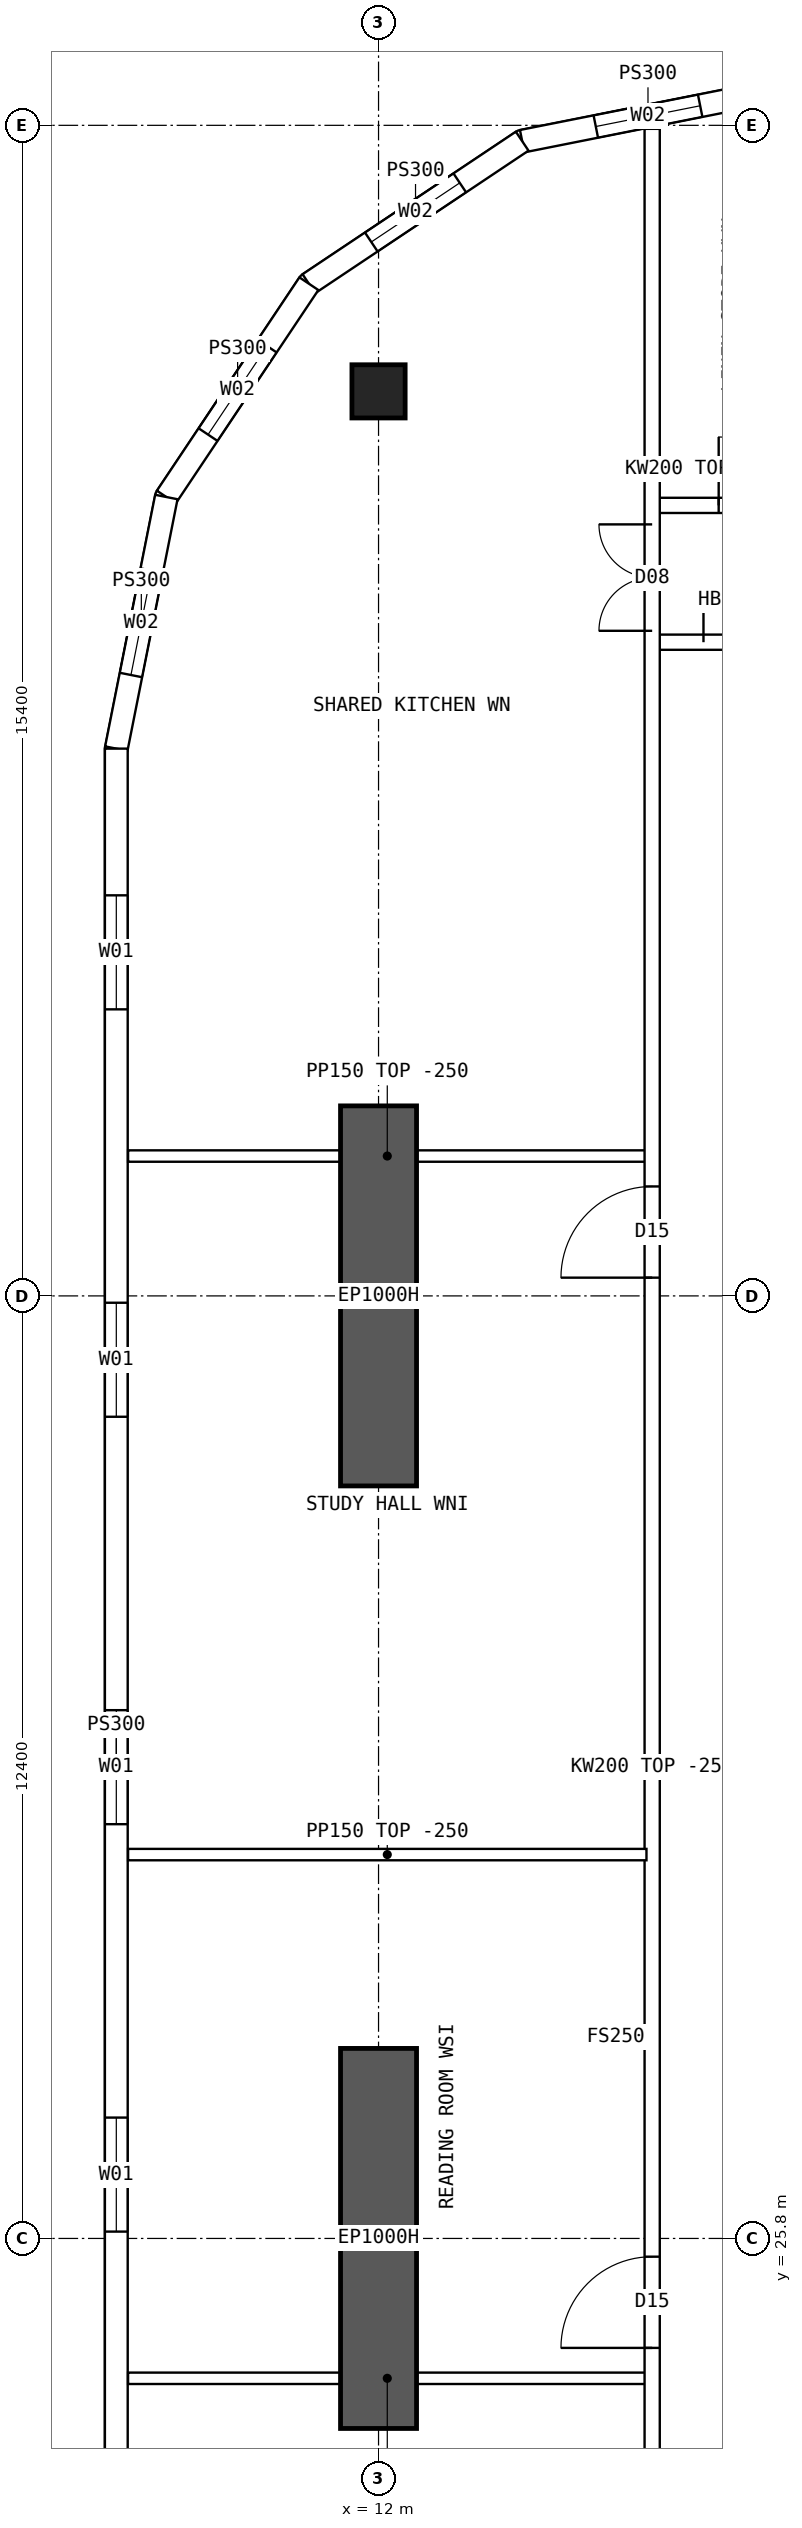
"""IFC4 building model, lengths in metres.
Left out: names, types, materials, properties, quantities, classifications, styles, units other than length and angle.
Written with IfcOpenShell. Run it as: python <this file> out.ifc"""

import sys

from ifc_helpers import new_model, si_unit, direction, frame, frame_2d, origin, origin_2d, place, context, subcontext, project, spatial, polyline, rectangle, hollow_rectangle, outline, extrude, element, fill, save


model = new_model("IFC4")
c1 = context("Model", 3, precision=1e-05, world=origin(), true_north=direction((0.0, 1.0)))
c2 = subcontext(c1, "Body", "Model", "MODEL_VIEW")
j1 = project(units=[si_unit("LENGTHUNIT", "METRE"), si_unit("PLANEANGLEUNIT", "RADIAN")], contexts=[c1])
p1 = place(None, origin())
s1 = spatial("IfcSite", under=j1, at=p1, CompositionType="ELEMENT")
p2 = place(p1, origin())
s2 = spatial("IfcBuilding", under=s1, at=p2, CompositionType="ELEMENT")
p3 = place(p2, frame((0.0, 0.0, 156.1)))
s3 = spatial("IfcBuildingStorey", under=s2, at=p3, CompositionType="ELEMENT", Elevation=156.1)
p4 = place(p3, frame((12.0, 50.1, 0.0), z_axis=(0.0, 0.0, 1.0), x_axis=(1.0, 0.0, 0.0)))
e1 = element("IfcColumn", 1, at=p4, inside=s3, PredefinedType="COLUMN", context=c2, shape_type="SweptSolid", body=[
    extrude(hollow_rectangle(XDim=0.7, YDim=0.7, WallThickness=0.07, at=origin_2d()), origin(), (0.0, 0.0, 1.0), 3.75),
])
for number, where, z_axis, x_axis in (
    (2, (12.0, 23.3, 0.0), (0.0, 0.0, 1.0), (0.0, 1.0, 0.0)),
    (3, (12.0, 35.7, 0.0), (0.0, 0.0, 1.0), (0.0, 1.0, 0.0)),
):
    element("IfcWall", number, at=place(p3, frame(where, z_axis=z_axis, x_axis=x_axis)), inside=s3, PredefinedType="SHEAR", context=c2, shape_type="SweptSolid", body=[
        extrude(rectangle(XDim=5.0, YDim=1.0, at=frame_2d((2.5, 0.0))), origin(), (0.0, 0.0, 1.0), 3.75),
    ])
p5 = place(p3, frame((8.55, 45.4, 0.0), z_axis=(0.0, 0.0, 1.0), x_axis=(0.0, -1.0, 0.0)))
e4 = element("IfcWall", 4, at=p5, inside=s3, PredefinedType="SOLIDWALL", context=c2, shape_type="SweptSolid", body=[
    extrude(outline(polyline([(-0.015, -0.15), (26.815, -0.15), (26.785, 0.15), (0.015, 0.15), (-0.015, -0.15)])), origin(), (0.0, 0.0, 1.0), 3.5),
])
p6 = place(p5, frame((1.93, 0.0, 0.9)))
e5 = element("IfcOpeningElement", 5, at=p6, cuts=e4, PredefinedType="OPENING", context=c2, shape_type="SweptSolid", body=[
    extrude(rectangle(XDim=1.5, YDim=2.0, at=frame_2d((0.75, 1.0))), frame((0.0, 0.16, 0.0), z_axis=(0.0, -1.0, 0.0), x_axis=(1.0, 0.0, 0.0)), (0.0, 0.0, 1.0), 0.32),
])
p7 = place(p5, frame((7.29, 0.0, 0.9)))
e6 = element("IfcOpeningElement", 6, at=p7, cuts=e4, PredefinedType="OPENING", context=c2, shape_type="SweptSolid", body=[
    extrude(rectangle(XDim=1.5, YDim=2.0, at=frame_2d((0.75, 1.0))), frame((0.0, 0.16, 0.0), z_axis=(0.0, -1.0, 0.0), x_axis=(1.0, 0.0, 0.0)), (0.0, 0.0, 1.0), 0.32),
])
p8 = place(p5, frame((12.65, 0.0, 0.9)))
e7 = element("IfcOpeningElement", 7, at=p8, cuts=e4, PredefinedType="OPENING", context=c2, shape_type="SweptSolid", body=[
    extrude(rectangle(XDim=1.5, YDim=2.0, at=frame_2d((0.75, 1.0))), frame((0.0, 0.16, 0.0), z_axis=(0.0, -1.0, 0.0), x_axis=(1.0, 0.0, 0.0)), (0.0, 0.0, 1.0), 0.32),
])
p9 = place(p5, frame((18.01, 0.0, 0.9)))
e8 = element("IfcOpeningElement", 8, at=p9, cuts=e4, PredefinedType="OPENING", context=c2, shape_type="SweptSolid", body=[
    extrude(rectangle(XDim=1.5, YDim=2.0, at=frame_2d((0.75, 1.0))), frame((0.0, 0.16, 0.0), z_axis=(0.0, -1.0, 0.0), x_axis=(1.0, 0.0, 0.0)), (0.0, 0.0, 1.0), 0.32),
])
p10 = place(p5, frame((23.37, 0.0, 0.9)))
e9 = element("IfcOpeningElement", 9, at=p10, cuts=e4, PredefinedType="OPENING", context=c2, shape_type="SweptSolid", body=[
    extrude(rectangle(XDim=1.5, YDim=2.0, at=frame_2d((0.75, 1.0))), frame((0.0, 0.16, 0.0), z_axis=(0.0, -1.0, 0.0), x_axis=(1.0, 0.0, 0.0)), (0.0, 0.0, 1.0), 0.32),
])
p11 = place(p3, frame((17.2, 54.05, 0.0), z_axis=(0.0, 0.0, 1.0), x_axis=(-0.98078325777, -0.195100490205, 0.0)))
e10 = element("IfcWall", 10, at=p11, inside=s3, PredefinedType="SOLIDWALL", context=c2, shape_type="SweptSolid", body=[
    extrude(outline(polyline([(-0.03, -0.15), (3.405, -0.15), (3.345, 0.15), (0.03, 0.15), (-0.03, -0.15)])), origin(), (0.0, 0.0, 1.0), 3.5),
])
p12 = place(p11, frame((0.988, 0.0, 0.9)))
e11 = element("IfcOpeningElement", 11, at=p12, cuts=e10, PredefinedType="OPENING", context=c2, shape_type="SweptSolid", body=[
    extrude(rectangle(XDim=1.4, YDim=1.8, at=frame_2d((0.7, 0.9))), frame((0.0, 0.16, 0.0), z_axis=(0.0, -1.0, 0.0), x_axis=(1.0, 0.0, 0.0)), (0.0, 0.0, 1.0), 0.32),
])
p13 = place(p3, frame((13.89, 53.392, 0.0), z_axis=(0.0, 0.0, 1.0), x_axis=(-0.831493450887, -0.555534554399, 0.0)))
e12 = element("IfcWall", 12, at=p13, inside=s3, PredefinedType="SOLIDWALL", context=c2, shape_type="SweptSolid", body=[
    extrude(outline(polyline([(-0.03, -0.15), (3.405, -0.15), (3.345, 0.15), (0.03, 0.15), (-0.03, -0.15)])), origin(), (0.0, 0.0, 1.0), 3.5),
])
p14 = place(p13, frame((0.988, 0.0, 0.9)))
e13 = element("IfcOpeningElement", 13, at=p14, cuts=e12, PredefinedType="OPENING", context=c2, shape_type="SweptSolid", body=[
    extrude(rectangle(XDim=1.4, YDim=1.8, at=frame_2d((0.7, 0.9))), frame((0.0, 0.16, 0.0), z_axis=(0.0, -1.0, 0.0), x_axis=(1.0, 0.0, 0.0)), (0.0, 0.0, 1.0), 0.32),
])
p15 = place(p3, frame((11.083, 51.517, 0.0), z_axis=(0.0, 0.0, 1.0), x_axis=(-0.555534554399, -0.831493450887, 0.0)))
e14 = element("IfcWall", 14, at=p15, inside=s3, PredefinedType="SOLIDWALL", context=c2, shape_type="SweptSolid", body=[
    extrude(outline(polyline([(-0.03, -0.15), (3.405, -0.15), (3.345, 0.15), (0.03, 0.15), (-0.03, -0.15)])), origin(), (0.0, 0.0, 1.0), 3.5),
])
p16 = place(p15, frame((0.988, 0.0, 0.9)))
e15 = element("IfcOpeningElement", 15, at=p16, cuts=e14, PredefinedType="OPENING", context=c2, shape_type="SweptSolid", body=[
    extrude(rectangle(XDim=1.4, YDim=1.8, at=frame_2d((0.7, 0.9))), frame((0.0, 0.16, 0.0), z_axis=(0.0, -1.0, 0.0), x_axis=(1.0, 0.0, 0.0)), (0.0, 0.0, 1.0), 0.32),
])
p17 = place(p3, frame((9.208, 48.71, 0.0), z_axis=(0.0, 0.0, 1.0), x_axis=(-0.19508664885, -0.980786011034, 0.0)))
e16 = element("IfcWall", 16, at=p17, inside=s3, PredefinedType="SOLIDWALL", context=c2, shape_type="SweptSolid", body=[
    extrude(outline(polyline([(-0.03, -0.15), (3.39, -0.15), (3.36, 0.15), (0.03, 0.15), (-0.03, -0.15)])), origin(), (0.0, 0.0, 1.0), 3.5),
])
p18 = place(p17, frame((0.988, 0.0, 0.9)))
e17 = element("IfcOpeningElement", 17, at=p18, cuts=e16, PredefinedType="OPENING", context=c2, shape_type="SweptSolid", body=[
    extrude(rectangle(XDim=1.4, YDim=1.8, at=frame_2d((0.7, 0.9))), frame((0.0, 0.16, 0.0), z_axis=(0.0, -1.0, 0.0), x_axis=(1.0, 0.0, 0.0)), (0.0, 0.0, 1.0), 0.32),
])
p19 = place(p3, frame((15.6, 48.6, 0.0), z_axis=(0.0, 0.0, 1.0), x_axis=(1.0, 0.0, 0.0)))
e18 = element("IfcWall", 18, at=p19, inside=s3, PredefinedType="SOLIDWALL", context=c2, shape_type="SweptSolid", body=[
    extrude(rectangle(XDim=1.975, YDim=0.2, at=frame_2d((0.987, 0.0))), origin(), (0.0, 0.0, 1.0), 3.5),
])
p20 = place(p19, frame((0.875, 0.0, 0.0)))
e19 = element("IfcOpeningElement", 19, at=p20, cuts=e18, PredefinedType="OPENING", context=c2, shape_type="SweptSolid", body=[
    extrude(rectangle(XDim=0.9, YDim=2.1, at=frame_2d((0.45, 1.05))), frame((0.0, 0.11, 0.0), z_axis=(0.0, -1.0, 0.0), x_axis=(1.0, 0.0, 0.0)), (0.0, 0.0, 1.0), 0.22),
])
p21 = place(p3, frame((15.6, 46.8, 0.0), z_axis=(0.0, 0.0, 1.0), x_axis=(1.0, 0.0, 0.0)))
e20 = element("IfcWall", 20, at=p21, inside=s3, PredefinedType="SOLIDWALL", context=c2, shape_type="SweptSolid", body=[
    extrude(rectangle(XDim=1.975, YDim=0.2, at=frame_2d((0.987, 0.0))), origin(), (0.0, 0.0, 1.0), 3.5),
])
p22 = place(p21, frame((0.675, 0.0, 0.0)))
e21 = element("IfcOpeningElement", 21, at=p22, cuts=e20, PredefinedType="OPENING", context=c2, shape_type="SweptSolid", body=[
    extrude(rectangle(XDim=1.2, YDim=2.1, at=frame_2d((0.6, 1.05))), frame((0.0, 0.11, 0.0), z_axis=(0.0, -1.0, 0.0), x_axis=(1.0, 0.0, 0.0)), (0.0, 0.0, 1.0), 0.22),
])
p23 = place(p3, frame((8.705, 30.85, 0.0), z_axis=(0.0, 0.0, 1.0), x_axis=(1.0, 0.0, 0.0)))
e22 = element("IfcWall", 22, at=p23, inside=s3, PredefinedType="PARTITIONING", context=c2, shape_type="SweptSolid", body=[
    extrude(outline(polyline([(0.0, 0.0), (6.82, 0.0), (6.82, 3.5), (3.597, 3.5), (3.595, 3.05), (2.997, 3.05), (2.995, 3.5), (0.0, 3.5), (0.0, 0.0)])), frame((0.0, 0.075, 0.0), z_axis=(0.0, -1.0, 0.0), x_axis=(1.0, 0.0, 0.0)), (0.0, 0.0, 1.0), 0.15),
])
p24 = place(p3, frame((15.6, 10.446, 0.0), z_axis=(0.0, 0.0, 1.0), x_axis=(0.0, 1.0, 0.0)))
e23 = element("IfcWall", 23, at=p24, inside=s3, PredefinedType="SOLIDWALL", context=c2, shape_type="SweptSolid", body=[
    extrude(rectangle(XDim=43.107, YDim=0.2, at=frame_2d((21.554, 0.0))), origin(), (0.0, 0.0, 1.0), 3.5),
])
p25 = place(p24, frame((13.914, 0.0, 0.0)))
e24 = element("IfcOpeningElement", 24, at=p25, cuts=e23, PredefinedType="OPENING", context=c2, shape_type="SweptSolid", body=[
    extrude(rectangle(XDim=1.2, YDim=2.1, at=frame_2d((0.6, 1.05))), frame((0.0, 0.11, 0.0), z_axis=(0.0, -1.0, 0.0), x_axis=(1.0, 0.0, 0.0)), (0.0, 0.0, 1.0), 0.22),
])
p26 = place(p24, frame((27.994, 0.0, 0.0)))
e25 = element("IfcOpeningElement", 25, at=p26, cuts=e23, PredefinedType="OPENING", context=c2, shape_type="SweptSolid", body=[
    extrude(rectangle(XDim=1.2, YDim=2.1, at=frame_2d((0.6, 1.05))), frame((0.0, 0.11, 0.0), z_axis=(0.0, -1.0, 0.0), x_axis=(1.0, 0.0, 0.0)), (0.0, 0.0, 1.0), 0.22),
])
p27 = place(p24, frame((5.104, 0.0, 0.0)))
e26 = element("IfcOpeningElement", 26, at=p27, cuts=e23, PredefinedType="OPENING", context=c2, shape_type="SweptSolid", body=[
    extrude(rectangle(XDim=1.4, YDim=2.1, at=frame_2d((0.7, 1.05))), frame((0.0, 0.11, 0.0), z_axis=(0.0, -1.0, 0.0), x_axis=(1.0, 0.0, 0.0)), (0.0, 0.0, 1.0), 0.22),
])
p28 = place(p24, frame((36.504, 0.0, 0.0)))
e27 = element("IfcOpeningElement", 27, at=p28, cuts=e23, PredefinedType="OPENING", context=c2, shape_type="SweptSolid", body=[
    extrude(rectangle(XDim=1.4, YDim=2.1, at=frame_2d((0.7, 1.05))), frame((0.0, 0.11, 0.0), z_axis=(0.0, -1.0, 0.0), x_axis=(1.0, 0.0, 0.0)), (0.0, 0.0, 1.0), 0.22),
])
for number, where, z_axis, x_axis in (
    (28, (8.705, 23.96, 0.0), (0.0, 0.0, 1.0), (1.0, 0.0, 0.0)),
    (29, (8.705, 40.04, 0.0), (0.0, 0.0, 1.0), (1.0, 0.0, 0.0)),
):
    element("IfcWall", number, at=place(p3, frame(where, z_axis=z_axis, x_axis=x_axis)), inside=s3, PredefinedType="PARTITIONING", context=c2, shape_type="SweptSolid", body=[
        extrude(rectangle(XDim=6.82, YDim=0.15, at=frame_2d((3.41, 0.0))), origin(), (0.0, 0.0, 1.0), 3.5),
    ])
p29 = place(p6, origin())
e30 = element("IfcWindow", 30, at=p29, inside=s3, PartitioningType="SINGLE_PANEL", PredefinedType="WINDOW", context=c2, shape_type="SweptSolid", body=[
    extrude(rectangle(XDim=1.5, YDim=2.0, at=frame_2d((0.75, 1.0))), frame((0.0, 0.03, 0.0), z_axis=(0.0, -1.0, 0.0), x_axis=(1.0, 0.0, 0.0)), (0.0, 0.0, 1.0), 0.06),
])
fill(e5, e30)
p30 = place(p7, origin())
e31 = element("IfcWindow", 31, at=p30, inside=s3, PartitioningType="SINGLE_PANEL", PredefinedType="WINDOW", context=c2, shape_type="SweptSolid", body=[
    extrude(rectangle(XDim=1.5, YDim=2.0, at=frame_2d((0.75, 1.0))), frame((0.0, 0.03, 0.0), z_axis=(0.0, -1.0, 0.0), x_axis=(1.0, 0.0, 0.0)), (0.0, 0.0, 1.0), 0.06),
])
fill(e6, e31)
p31 = place(p8, origin())
e32 = element("IfcWindow", 32, at=p31, inside=s3, PartitioningType="SINGLE_PANEL", PredefinedType="WINDOW", context=c2, shape_type="SweptSolid", body=[
    extrude(rectangle(XDim=1.5, YDim=2.0, at=frame_2d((0.75, 1.0))), frame((0.0, 0.03, 0.0), z_axis=(0.0, -1.0, 0.0), x_axis=(1.0, 0.0, 0.0)), (0.0, 0.0, 1.0), 0.06),
])
fill(e7, e32)
p32 = place(p9, origin())
e33 = element("IfcWindow", 33, at=p32, inside=s3, PartitioningType="SINGLE_PANEL", PredefinedType="WINDOW", context=c2, shape_type="SweptSolid", body=[
    extrude(rectangle(XDim=1.5, YDim=2.0, at=frame_2d((0.75, 1.0))), frame((0.0, 0.03, 0.0), z_axis=(0.0, -1.0, 0.0), x_axis=(1.0, 0.0, 0.0)), (0.0, 0.0, 1.0), 0.06),
])
fill(e8, e33)
p33 = place(p12, origin())
e34 = element("IfcWindow", 34, at=p33, inside=s3, PartitioningType="SINGLE_PANEL", PredefinedType="WINDOW", context=c2, shape_type="SweptSolid", body=[
    extrude(rectangle(XDim=1.4, YDim=1.8, at=frame_2d((0.7, 0.9))), frame((0.0, 0.03, 0.0), z_axis=(0.0, -1.0, 0.0), x_axis=(1.0, 0.0, 0.0)), (0.0, 0.0, 1.0), 0.06),
])
fill(e11, e34)
p34 = place(p14, origin())
e35 = element("IfcWindow", 35, at=p34, inside=s3, PartitioningType="SINGLE_PANEL", PredefinedType="WINDOW", context=c2, shape_type="SweptSolid", body=[
    extrude(rectangle(XDim=1.4, YDim=1.8, at=frame_2d((0.7, 0.9))), frame((0.0, 0.03, 0.0), z_axis=(0.0, -1.0, 0.0), x_axis=(1.0, 0.0, 0.0)), (0.0, 0.0, 1.0), 0.06),
])
fill(e13, e35)
p35 = place(p16, origin())
e36 = element("IfcWindow", 36, at=p35, inside=s3, PartitioningType="SINGLE_PANEL", PredefinedType="WINDOW", context=c2, shape_type="SweptSolid", body=[
    extrude(rectangle(XDim=1.4, YDim=1.8, at=frame_2d((0.7, 0.9))), frame((0.0, 0.03, 0.0), z_axis=(0.0, -1.0, 0.0), x_axis=(1.0, 0.0, 0.0)), (0.0, 0.0, 1.0), 0.06),
])
fill(e15, e36)
p36 = place(p18, origin())
e37 = element("IfcWindow", 37, at=p36, inside=s3, PartitioningType="SINGLE_PANEL", PredefinedType="WINDOW", context=c2, shape_type="SweptSolid", body=[
    extrude(rectangle(XDim=1.4, YDim=1.8, at=frame_2d((0.7, 0.9))), frame((0.0, 0.03, 0.0), z_axis=(0.0, -1.0, 0.0), x_axis=(1.0, 0.0, 0.0)), (0.0, 0.0, 1.0), 0.06),
])
fill(e17, e37)
p37 = place(p22, origin())
e38 = element("IfcDoor", 38, at=p37, inside=s3, OperationType="DOUBLE_DOOR_SINGLE_SWING", PredefinedType="DOOR", context=c2, shape_type="SweptSolid", body=[
    extrude(rectangle(XDim=1.2, YDim=2.1, at=frame_2d((0.6, 1.05))), frame((0.0, 0.025, 0.0), z_axis=(0.0, -1.0, 0.0), x_axis=(1.0, 0.0, 0.0)), (0.0, 0.0, 1.0), 0.05),
])
fill(e21, e38)
p38 = place(p25, origin())
e39 = element("IfcDoor", 39, at=p38, inside=s3, OperationType="SINGLE_SWING_LEFT", PredefinedType="DOOR", context=c2, shape_type="SweptSolid", body=[
    extrude(rectangle(XDim=1.2, YDim=2.1, at=frame_2d((0.6, 1.05))), frame((0.0, 0.025, 0.0), z_axis=(0.0, -1.0, 0.0), x_axis=(1.0, 0.0, 0.0)), (0.0, 0.0, 1.0), 0.05),
])
fill(e24, e39)
p39 = place(p26, origin())
e40 = element("IfcDoor", 40, at=p39, inside=s3, OperationType="SINGLE_SWING_LEFT", PredefinedType="DOOR", context=c2, shape_type="SweptSolid", body=[
    extrude(rectangle(XDim=1.2, YDim=2.1, at=frame_2d((0.6, 1.05))), frame((0.0, 0.025, 0.0), z_axis=(0.0, -1.0, 0.0), x_axis=(1.0, 0.0, 0.0)), (0.0, 0.0, 1.0), 0.05),
])
fill(e25, e40)
p40 = place(p28, origin())
e41 = element("IfcDoor", 41, at=p40, inside=s3, OperationType="DOUBLE_DOOR_SINGLE_SWING", PredefinedType="DOOR", context=c2, shape_type="SweptSolid", body=[
    extrude(rectangle(XDim=1.4, YDim=2.1, at=frame_2d((0.7, 1.05))), frame((0.0, 0.025, 0.0), z_axis=(0.0, -1.0, 0.0), x_axis=(1.0, 0.0, 0.0)), (0.0, 0.0, 1.0), 0.05),
])
fill(e27, e41)
p41 = place(p20, origin())
e42 = element("IfcDoor", 42, at=p41, inside=s3, OperationType="SINGLE_SWING_LEFT", PredefinedType="DOOR", context=c2, shape_type="SweptSolid", body=[
    extrude(rectangle(XDim=0.9, YDim=2.1, at=frame_2d((0.45, 1.05))), frame((0.0, 0.025, 0.0), z_axis=(0.0, -1.0, 0.0), x_axis=(1.0, 0.0, 0.0)), (0.0, 0.0, 1.0), 0.05),
])
fill(e19, e42)
save(model, sys.argv[1])
